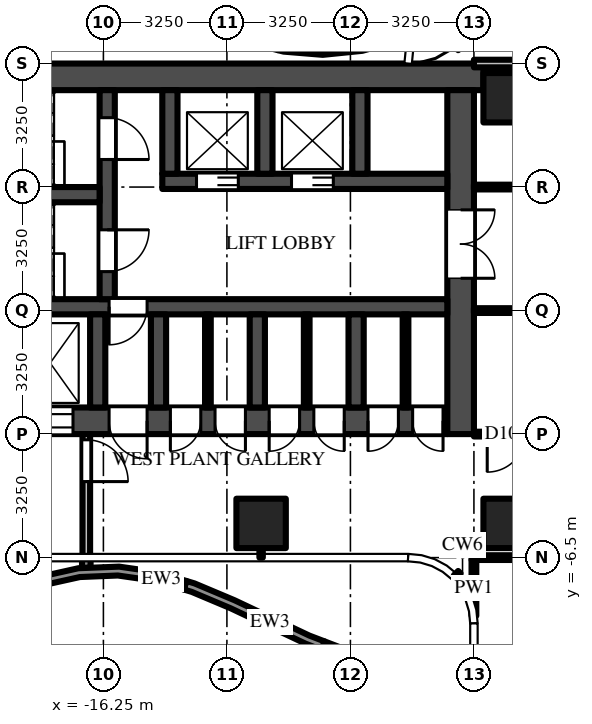
"""IFC4 building model, lengths in metres.
Left out: names, types, materials, properties, quantities, classifications, styles, units other than length and angle.
Written with IfcOpenShell. Run it as: python <this file> out.ifc"""

import sys

from ifc_helpers import new_model, si_unit, direction, frame, frame_2d, origin, origin_2d, place, context, subcontext, project, spatial, polyline, rectangle, outline, extrude, source, transform, mapped, element, fill, save


model = new_model("IFC4")
c1 = context("Model", 3, precision=1e-05, world=origin(), true_north=direction((0.0, 1.0)))
c2 = subcontext(c1, "Body", "Model", "MODEL_VIEW")
j1 = project(units=[si_unit("LENGTHUNIT", "METRE"), si_unit("PLANEANGLEUNIT", "RADIAN")], contexts=[c1])
p1 = place(None, origin())
s1 = spatial("IfcSite", under=j1, at=p1, CompositionType="ELEMENT")
p2 = place(p1, origin())
s2 = spatial("IfcBuilding", under=s1, at=p2, CompositionType="ELEMENT")
p3 = place(p2, frame((0.0, 0.0, 92.5)))
s3 = spatial("IfcBuildingStorey", under=s2, at=p3, CompositionType="ELEMENT", Elevation=92.5)
m1 = source(origin(), c2, "Body", "SweptSolid", [
    extrude(rectangle(XDim=1.3, YDim=1.3, at=origin_2d()), origin(), (0.0, 0.0, 1.0), 5.0),
])
for number, where, z_axis, x_axis in (
    (1, (-5.6, 5.6, 0.0), (0.0, 0.0, 1.0), (1.0, 0.0, 0.0)),
    (2, (-5.6, -5.6, 0.0), (0.0, 0.0, 1.0), (1.0, 0.0, 0.0)),
    (3, (-12.1, -5.6, 0.0), (0.0, 0.0, 1.0), (1.0, 0.0, 0.0)),
):
    element("IfcColumn", number, at=place(p3, frame(where, z_axis=z_axis, x_axis=x_axis)), inside=s3, PredefinedType="COLUMN", context=c2, shape_type="MappedRepresentation", body=[
        mapped(m1, transform((0.0, 0.0, 0.0))),
    ])
m2 = source(origin(), c2, "Body", "SweptSolid", [
    extrude(rectangle(XDim=16.5, YDim=0.7, at=frame_2d((8.25, 0.0))), origin(), (0.0, 0.0, 1.0), 4.75),
])
p4 = place(p3, frame((-6.25, 6.15, 0.0), z_axis=(0.0, 0.0, 1.0), x_axis=(-1.0, 0.0, 0.0)))
e4 = element("IfcWall", 4, at=p4, inside=s3, PredefinedType="SHEAR", context=c2, shape_type="MappedRepresentation", body=[
    mapped(m2, transform((0.0, 0.0, 0.0))),
])
m3 = source(origin(), c2, "Body", "SweptSolid", [
    extrude(rectangle(XDim=14.85, YDim=0.7, at=frame_2d((7.425, 0.0))), origin(), (0.0, 0.0, 1.0), 4.75),
])
p5 = place(p3, frame((-7.2, -2.9, 0.0), z_axis=(0.0, 0.0, 1.0), x_axis=(-1.0, 0.0, 0.0)))
e5 = element("IfcWall", 5, at=p5, inside=s3, PredefinedType="SHEAR", context=c2, shape_type="MappedRepresentation", body=[
    mapped(m3, transform((0.0, 0.0, 0.0))),
])
m4 = source(origin(), c2, "Body", "SweptSolid", [
    extrude(rectangle(XDim=1.3, YDim=2.1, at=frame_2d((0.65, 1.05))), frame((0.0, 0.36, 0.0), z_axis=(0.0, -1.0, 0.0), x_axis=(1.0, 0.0, 0.0)), (0.0, 0.0, 1.0), 0.72),
])
p6 = place(p5, frame((12.2, 0.0, 0.0)))
e6 = element("IfcOpeningElement", 6, at=p6, cuts=e5, PredefinedType="OPENING", context=c2, shape_type="MappedRepresentation", body=[
    mapped(m4, transform((0.0, 0.0, 0.0))),
])
m5 = source(origin(), c2, "Body", "SweptSolid", [
    extrude(rectangle(XDim=1.2, YDim=2.1, at=frame_2d((0.6, 1.05))), frame((0.0, 0.36, 0.0), z_axis=(0.0, -1.0, 0.0), x_axis=(1.0, 0.0, 0.0)), (0.0, 0.0, 1.0), 0.72),
])
p7 = place(p5, frame((9.85, 0.0, 0.0)))
e7 = element("IfcOpeningElement", 7, at=p7, cuts=e5, PredefinedType="OPENING", context=c2, shape_type="MappedRepresentation", body=[
    mapped(m5, transform((0.0, 0.0, 0.0))),
])
m6 = source(origin(), c2, "Body", "SweptSolid", [
    extrude(rectangle(XDim=1.0, YDim=2.1, at=frame_2d((0.5, 1.05))), frame((0.0, 0.36, 0.0), z_axis=(0.0, -1.0, 0.0), x_axis=(1.0, 0.0, 0.0)), (0.0, 0.0, 1.0), 0.72),
])
p8 = place(p5, frame((7.9, 0.0, 0.0)))
e8 = element("IfcOpeningElement", 8, at=p8, cuts=e5, PredefinedType="OPENING", context=c2, shape_type="MappedRepresentation", body=[
    mapped(m6, transform((0.0, 0.0, 0.0))),
])
m7 = source(origin(), c2, "Body", "SweptSolid", [
    extrude(rectangle(XDim=0.8, YDim=2.1, at=frame_2d((0.4, 1.05))), frame((0.0, 0.36, 0.0), z_axis=(0.0, -1.0, 0.0), x_axis=(1.0, 0.0, 0.0)), (0.0, 0.0, 1.0), 0.72),
])
p9 = place(p5, frame((0.113, 0.0, 0.0)))
e9 = element("IfcOpeningElement", 9, at=p9, cuts=e5, PredefinedType="OPENING", context=c2, shape_type="MappedRepresentation", body=[
    mapped(m7, transform((0.0, 0.0, 0.0))),
])
p10 = place(p5, frame((1.288, 0.0, 0.0)))
e10 = element("IfcOpeningElement", 10, at=p10, cuts=e5, PredefinedType="OPENING", context=c2, shape_type="MappedRepresentation", body=[
    mapped(m7, transform((0.0, 0.0, 0.0))),
])
p11 = place(p5, frame((2.712, 0.0, 0.0)))
e11 = element("IfcOpeningElement", 11, at=p11, cuts=e5, PredefinedType="OPENING", context=c2, shape_type="MappedRepresentation", body=[
    mapped(m7, transform((0.0, 0.0, 0.0))),
])
p12 = place(p5, frame((3.887, 0.0, 0.0)))
e12 = element("IfcOpeningElement", 12, at=p12, cuts=e5, PredefinedType="OPENING", context=c2, shape_type="MappedRepresentation", body=[
    mapped(m7, transform((0.0, 0.0, 0.0))),
])
p13 = place(p5, frame((5.312, 0.0, 0.0)))
e13 = element("IfcOpeningElement", 13, at=p13, cuts=e5, PredefinedType="OPENING", context=c2, shape_type="MappedRepresentation", body=[
    mapped(m7, transform((0.0, 0.0, 0.0))),
])
p14 = place(p5, frame((6.488, 0.0, 0.0)))
e14 = element("IfcOpeningElement", 14, at=p14, cuts=e5, PredefinedType="OPENING", context=c2, shape_type="MappedRepresentation", body=[
    mapped(m7, transform((0.0, 0.0, 0.0))),
])
m8 = source(origin(), c2, "Body", "SweptSolid", [
    extrude(rectangle(XDim=9.05, YDim=0.7, at=frame_2d((4.525, 0.0))), origin(), (0.0, 0.0, 1.0), 4.75),
])
p15 = place(p3, frame((-6.85, 5.8, 0.0), z_axis=(0.0, 0.0, 1.0), x_axis=(0.0, -1.0, 0.0)))
e15 = element("IfcWall", 15, at=p15, inside=s3, PredefinedType="SHEAR", context=c2, shape_type="MappedRepresentation", body=[
    mapped(m8, transform((0.0, 0.0, 0.0))),
])
m9 = source(origin(), c2, "Body", "SweptSolid", [
    extrude(rectangle(XDim=1.8, YDim=2.1, at=frame_2d((0.9, 1.05))), frame((0.0, 0.36, 0.0), z_axis=(0.0, -1.0, 0.0), x_axis=(1.0, 0.0, 0.0)), (0.0, 0.0, 1.0), 0.72),
])
p16 = place(p15, frame((3.15, 0.0, 0.0)))
e16 = element("IfcOpeningElement", 16, at=p16, cuts=e15, PredefinedType="OPENING", context=c2, shape_type="MappedRepresentation", body=[
    mapped(m9, transform((0.0, 0.0, 0.0))),
])
m10 = source(origin(), c2, "Body", "SweptSolid", [
    extrude(rectangle(XDim=7.5, YDim=0.4, at=frame_2d((3.75, 0.0))), origin(), (0.0, 0.0, 1.0), 4.75),
])
p17 = place(p3, frame((-7.2, 3.4, 0.0), z_axis=(0.0, 0.0, 1.0), x_axis=(-1.0, 0.0, 0.0)))
e17 = element("IfcWall", 17, at=p17, inside=s3, PredefinedType="SHEAR", context=c2, shape_type="MappedRepresentation", body=[
    mapped(m10, transform((0.0, 0.0, 0.0))),
])
m11 = source(origin(), c2, "Body", "SweptSolid", [
    extrude(rectangle(XDim=1.1, YDim=2.1, at=frame_2d((0.55, 1.05))), frame((0.0, 0.21, 0.0), z_axis=(0.0, -1.0, 0.0), x_axis=(1.0, 0.0, 0.0)), (0.0, 0.0, 1.0), 0.42),
])
p18 = place(p17, frame((3.0, 0.0, 0.0)))
e18 = element("IfcOpeningElement", 18, at=p18, cuts=e17, PredefinedType="OPENING", context=c2, shape_type="MappedRepresentation", body=[
    mapped(m11, transform((0.0, 0.0, 0.0))),
])
p19 = place(p17, frame((5.5, 0.0, 0.0)))
e19 = element("IfcOpeningElement", 19, at=p19, cuts=e17, PredefinedType="OPENING", context=c2, shape_type="MappedRepresentation", body=[
    mapped(m11, transform((0.0, 0.0, 0.0))),
])
m12 = source(origin(), c2, "Body", "SweptSolid", [
    extrude(rectangle(XDim=14.85, YDim=0.4, at=frame_2d((7.425, 0.0))), origin(), (0.0, 0.0, 1.0), 4.75),
])
p20 = place(p3, frame((-7.2, 0.1, 0.0), z_axis=(0.0, 0.0, 1.0), x_axis=(-1.0, 0.0, 0.0)))
e20 = element("IfcWall", 20, at=p20, inside=s3, PredefinedType="SHEAR", context=c2, shape_type="MappedRepresentation", body=[
    mapped(m12, transform((0.0, 0.0, 0.0))),
])
m13 = source(origin(), c2, "Body", "SweptSolid", [
    extrude(rectangle(XDim=1.0, YDim=2.1, at=frame_2d((0.5, 1.05))), frame((0.0, 0.21, 0.0), z_axis=(0.0, -1.0, 0.0), x_axis=(1.0, 0.0, 0.0)), (0.0, 0.0, 1.0), 0.42),
])
p21 = place(p20, frame((7.9, 0.0, 0.0)))
e21 = element("IfcOpeningElement", 21, at=p21, cuts=e20, PredefinedType="OPENING", context=c2, shape_type="MappedRepresentation", body=[
    mapped(m13, transform((0.0, 0.0, 0.0))),
])
m14 = source(origin(), c2, "Body", "SweptSolid", [
    extrude(rectangle(XDim=5.5, YDim=0.4, at=frame_2d((2.75, 0.0))), origin(), (0.0, 0.0, 1.0), 4.75),
])
p22 = place(p3, frame((-16.15, 5.8, 0.0), z_axis=(0.0, 0.0, 1.0), x_axis=(0.0, -1.0, 0.0)))
e22 = element("IfcWall", 22, at=p22, inside=s3, PredefinedType="SHEAR", context=c2, shape_type="MappedRepresentation", body=[
    mapped(m14, transform((0.0, 0.0, 0.0))),
])
p23 = place(p22, frame((0.725, 0.0, 0.0)))
e23 = element("IfcOpeningElement", 23, at=p23, cuts=e22, PredefinedType="OPENING", context=c2, shape_type="MappedRepresentation", body=[
    mapped(m11, transform((0.0, 0.0, 0.0))),
])
p24 = place(p22, frame((3.675, 0.0, 0.0)))
e24 = element("IfcOpeningElement", 24, at=p24, cuts=e22, PredefinedType="OPENING", context=c2, shape_type="MappedRepresentation", body=[
    mapped(m11, transform((0.0, 0.0, 0.0))),
])
m15 = source(origin(), c2, "Body", "SweptSolid", [
    extrude(rectangle(XDim=5.7, YDim=0.4, at=frame_2d((2.85, 0.0))), origin(), (0.0, 0.0, 1.0), 4.75),
])
p25 = place(p3, frame((-16.35, 3.05, 0.0), z_axis=(0.0, 0.0, 1.0), x_axis=(-1.0, 0.0, 0.0)))
e25 = element("IfcWall", 25, at=p25, inside=s3, PredefinedType="SHEAR", context=c2, shape_type="MappedRepresentation", body=[
    mapped(m15, transform((0.0, 0.0, 0.0))),
])
m16 = source(origin(), c2, "Body", "SweptSolid", [
    extrude(rectangle(XDim=2.2, YDim=0.4, at=frame_2d((1.1, 0.0))), origin(), (0.0, 0.0, 1.0), 4.75),
])
for number, where, z_axis, x_axis in (
    (26, (-9.5, 5.8, 0.0), (0.0, 0.0, 1.0), (0.0, -1.0, 0.0)),
    (27, (-12.0, 5.8, 0.0), (0.0, 0.0, 1.0), (0.0, -1.0, 0.0)),
    (28, (-14.5, 5.8, 0.0), (0.0, 0.0, 1.0), (0.0, -1.0, 0.0)),
):
    element("IfcWall", number, at=place(p3, frame(where, z_axis=z_axis, x_axis=x_axis)), inside=s3, PredefinedType="SHEAR", context=c2, shape_type="MappedRepresentation", body=[
        mapped(m16, transform((0.0, 0.0, 0.0))),
    ])
m17 = source(origin(), c2, "Body", "SweptSolid", [
    extrude(rectangle(XDim=2.45, YDim=0.4, at=frame_2d((1.225, 0.0))), origin(), (0.0, 0.0, 1.0), 4.75),
])
for number, where, z_axis, x_axis in (
    (29, (-9.6, -0.1, 0.0), (0.0, 0.0, 1.0), (0.0, -1.0, 0.0)),
    (30, (-12.2, -0.1, 0.0), (0.0, 0.0, 1.0), (0.0, -1.0, 0.0)),
    (31, (-14.8, -0.1, 0.0), (0.0, 0.0, 1.0), (0.0, -1.0, 0.0)),
    (32, (-16.4, -0.1, 0.0), (0.0, 0.0, 1.0), (0.0, -1.0, 0.0)),
):
    element("IfcWall", number, at=place(p3, frame(where, z_axis=z_axis, x_axis=x_axis)), inside=s3, PredefinedType="SHEAR", context=c2, shape_type="MappedRepresentation", body=[
        mapped(m17, transform((0.0, 0.0, 0.0))),
    ])
m18 = source(origin(), c2, "Body", "SweptSolid", [
    extrude(rectangle(XDim=3.25, YDim=0.2, at=frame_2d((1.625, 0.0))), origin(), (0.0, 0.0, 1.0), 4.75),
])
p26 = place(p3, frame((-16.7, -3.25, 0.0), z_axis=(0.0, 0.0, 1.0), x_axis=(0.0, -1.0, 0.0)))
e33 = element("IfcWall", 33, at=p26, inside=s3, PredefinedType="PARTITIONING", context=c2, shape_type="MappedRepresentation", body=[
    mapped(m18, transform((0.0, 0.0, 0.0))),
])
m19 = source(origin(), c2, "Body", "SweptSolid", [
    extrude(rectangle(XDim=1.1, YDim=2.1, at=frame_2d((0.55, 1.05))), frame((0.0, 0.11, 0.0), z_axis=(0.0, -1.0, 0.0), x_axis=(1.0, 0.0, 0.0)), (0.0, 0.0, 1.0), 0.22),
])
p27 = place(p26, frame((0.15, 0.0, 0.0)))
e34 = element("IfcOpeningElement", 34, at=p27, cuts=e33, PredefinedType="OPENING", context=c2, shape_type="MappedRepresentation", body=[
    mapped(m19, transform((0.0, 0.0, 0.0))),
])
m20 = source(origin(), c2, "Body", "SweptSolid", [
    extrude(rectangle(XDim=2.45, YDim=0.15, at=frame_2d((1.225, 0.0))), origin(), (0.0, 0.0, 1.0), 4.75),
])
for number, where, z_axis, x_axis in (
    (35, (-8.3, -0.1, 0.0), (0.0, 0.0, 1.0), (0.0, -1.0, 0.0)),
    (36, (-10.9, -0.1, 0.0), (0.0, 0.0, 1.0), (0.0, -1.0, 0.0)),
    (37, (-13.5, -0.1, 0.0), (0.0, 0.0, 1.0), (0.0, -1.0, 0.0)),
):
    element("IfcWall", number, at=place(p3, frame(where, z_axis=z_axis, x_axis=x_axis)), inside=s3, PredefinedType="PARTITIONING", context=c2, shape_type="MappedRepresentation", body=[
        mapped(m20, transform((0.0, 0.0, 0.0))),
    ])
p28 = place(p3, frame((-16.7, -6.5, 0.0), z_axis=(0.0, 0.0, 1.0), x_axis=(0.0, -1.0, 0.0)))
e38 = element("IfcWall", 38, at=p28, inside=s3, PredefinedType="PARAPET", context=c2, shape_type="SweptSolid", body=[
    extrude(rectangle(XDim=0.268, YDim=0.225, at=frame_2d((0.134, 0.0))), origin(), (0.0, 0.0, 1.0), 1.1),
])
p29 = place(p3, origin())
e39 = element("IfcWall", 39, at=p29, inside=s3, PredefinedType="PARAPET", context=c2, shape_type="SweptSolid", body=[
    extrude(outline(polyline([(-11.6, 7.079), (-11.461, 7.044), (-10.47, 6.964), (-9.47, 7.068), (-8.543, 7.324), (-8.396, 7.406), (-8.194, 7.598), (-8.121, 7.709), (-7.927, 7.579), (-8.021, 7.439), (-8.229, 7.237), (-8.422, 7.119), (-8.466, 7.101), (-9.436, 6.835), (-10.478, 6.729), (-11.509, 6.814), (-11.658, 6.852), (-11.6, 7.079)])), origin(), (0.0, 0.0, 1.0), 1.1),
])
e40 = element("IfcWall", 40, at=p29, inside=s3, PredefinedType="PARAPET", context=c2, shape_type="SweptSolid", body=[
    extrude(outline(polyline([(-7.667, -10.863), (-7.699, -10.782), (-8.24, -9.633), (-8.344, -9.506), (-8.373, -9.486), (-8.528, -9.431), (-8.94, -9.388), (-9.936, -9.145), (-10.512, -8.925), (-10.429, -8.705), (-9.859, -8.923), (-8.892, -9.157), (-8.49, -9.198), (-8.444, -9.209), (-8.263, -9.276), (-8.185, -9.331), (-8.06, -9.478), (-8.034, -9.519), (-7.485, -10.685), (-7.449, -10.777), (-7.667, -10.863)])), origin(), (0.0, 0.0, 1.0), 1.1),
])
e41 = element("IfcWall", 41, at=p29, inside=s3, PredefinedType="PARAPET", context=c2, shape_type="SweptSolid", body=[
    extrude(outline(polyline([(-10.512, -8.925), (-10.925, -8.767), (-12.899, -7.834), (-13.926, -7.402), (-14.135, -7.339), (-14.067, -7.114), (-13.852, -7.179), (-12.802, -7.621), (-10.829, -8.552), (-10.429, -8.705), (-10.512, -8.925)])), origin(), (0.0, 0.0, 1.0), 1.1),
])
e42 = element("IfcWall", 42, at=p29, inside=s3, PredefinedType="PARAPET", context=c2, shape_type="SweptSolid", body=[
    extrude(outline(polyline([(-14.135, -7.339), (-14.879, -7.113), (-15.87, -6.971), (-16.866, -7.011), (-17.913, -7.243), (-17.918, -7.245), (-17.969, -7.016), (-16.907, -6.779), (-15.834, -6.738), (-14.837, -6.882), (-14.067, -7.114), (-14.135, -7.339)])), origin(), (0.0, 0.0, 1.0), 1.1),
])
m21 = source(origin(), c2, "Body", "SweptSolid", [
    extrude(rectangle(XDim=1.469, YDim=0.125, at=frame_2d((0.734, 0.0))), origin(), (0.0, 0.0, 1.0), 4.75),
])
p30 = place(p3, frame((-6.5, -6.562, 0.0), z_axis=(0.0, 0.0, 1.0), x_axis=(0.0, -1.0, 0.0)))
e43 = element("IfcWall", 43, at=p30, inside=s3, PredefinedType="PARTITIONING", context=c2, shape_type="MappedRepresentation", body=[
    mapped(m21, transform((0.0, 0.0, 0.0))),
])
m22 = source(origin(), c2, "Body", "SweptSolid", [
    extrude(rectangle(XDim=5.425, YDim=0.125, at=frame_2d((2.712, 0.0))), origin(), (0.0, 0.0, 1.0), 4.23),
])
p31 = place(p3, frame((-1.137, -6.5, 0.0), z_axis=(0.0, 0.0, 1.0), x_axis=(-1.0, 0.0, 0.0)))
e44 = element("IfcWall", 44, at=p31, inside=s3, PredefinedType="PARTITIONING", context=c2, shape_type="MappedRepresentation", body=[
    mapped(m22, transform((0.0, 0.0, 0.0))),
])
m23 = source(origin(), c2, "Body", "SweptSolid", [
    extrude(rectangle(XDim=5.363, YDim=0.125, at=frame_2d((2.681, 0.0))), origin(), (0.0, 0.0, 1.0), 3.968),
])
p32 = place(p3, frame((-1.137, -3.25, 0.0), z_axis=(0.0, 0.0, 1.0), x_axis=(-1.0, 0.0, 0.0)))
e45 = element("IfcWall", 45, at=p32, inside=s3, PredefinedType="PARTITIONING", context=c2, shape_type="MappedRepresentation", body=[
    mapped(m23, transform((0.0, 0.0, 0.0))),
])
m24 = source(origin(), c2, "Body", "SweptSolid", [
    extrude(rectangle(XDim=1.0, YDim=2.1, at=frame_2d((0.5, 1.05))), frame((0.0, 0.073, 0.0), z_axis=(0.0, -1.0, 0.0), x_axis=(1.0, 0.0, 0.0)), (0.0, 0.0, 1.0), 0.145),
])
p33 = place(p32, frame((4.012, 0.0, 0.0)))
e46 = element("IfcOpeningElement", 46, at=p33, cuts=e45, PredefinedType="OPENING", context=c2, shape_type="MappedRepresentation", body=[
    mapped(m24, transform((0.0, 0.0, 0.0))),
])
p34 = place(p3, frame((-1.137, 0.0, 0.0), z_axis=(0.0, 0.0, 1.0), x_axis=(-1.0, 0.0, 0.0)))
e47 = element("IfcWall", 47, at=p34, inside=s3, PredefinedType="PARTITIONING", context=c2, shape_type="MappedRepresentation", body=[
    mapped(m23, transform((0.0, 0.0, 0.0))),
])
p35 = place(p3, frame((-6.5, 3.25, 0.0), z_axis=(0.0, 0.0, 1.0), x_axis=(1.0, 0.0, 0.0)))
e48 = element("IfcWall", 48, at=p35, inside=s3, PredefinedType="PARTITIONING", context=c2, shape_type="MappedRepresentation", body=[
    mapped(m23, transform((0.0, 0.0, 0.0))),
])
p36 = place(p35, frame((3.95, 0.0, 0.0)))
e49 = element("IfcOpeningElement", 49, at=p36, cuts=e48, PredefinedType="OPENING", context=c2, shape_type="MappedRepresentation", body=[
    mapped(m24, transform((0.0, 0.0, 0.0))),
])
p37 = place(p3, frame((-6.5, 6.5, 0.0), z_axis=(0.0, 0.0, 1.0), x_axis=(1.0, 0.0, 0.0)))
e50 = element("IfcWall", 50, at=p37, inside=s3, PredefinedType="PARTITIONING", context=c2, shape_type="SweptSolid", body=[
    extrude(rectangle(XDim=5.363, YDim=0.2, at=frame_2d((2.681, 0.0))), origin(), (0.0, 0.0, 1.0), 4.23),
])
m25 = source(origin(), c2, "Body", "SweptSolid", [
    extrude(rectangle(XDim=1.1, YDim=2.1, at=frame_2d((0.55, 1.05))), frame((0.0, 0.025, 0.0), z_axis=(0.0, -1.0, 0.0), x_axis=(1.0, 0.0, 0.0)), (0.0, 0.0, 1.0), 0.05),
])
p38 = place(p18, origin())
e51 = element("IfcDoor", 51, at=p38, inside=s3, OperationType="DOUBLE_DOOR_SLIDING", PredefinedType="DOOR", context=c2, shape_type="MappedRepresentation", body=[
    mapped(m25, transform((0.0, 0.0, 0.0))),
])
fill(e18, e51)
p39 = place(p19, origin())
e52 = element("IfcDoor", 52, at=p39, inside=s3, OperationType="DOUBLE_DOOR_SLIDING", PredefinedType="DOOR", context=c2, shape_type="MappedRepresentation", body=[
    mapped(m25, transform((0.0, 0.0, 0.0))),
])
fill(e19, e52)
m26 = source(origin(), c2, "Body", "SweptSolid", [
    extrude(rectangle(XDim=1.2, YDim=2.1, at=frame_2d((0.6, 1.05))), frame((0.0, -0.275, 0.0), z_axis=(0.0, -1.0, 0.0), x_axis=(1.0, 0.0, 0.0)), (0.0, 0.0, 1.0), 0.05),
])
p40 = place(p7, origin())
e53 = element("IfcDoor", 53, at=p40, inside=s3, OperationType="DOUBLE_DOOR_SLIDING", PredefinedType="DOOR", context=c2, shape_type="MappedRepresentation", body=[
    mapped(m26, transform((0.0, 0.0, 0.0))),
])
fill(e7, e53)
m27 = source(origin(), c2, "Body", "SweptSolid", [
    extrude(rectangle(XDim=1.8, YDim=2.1, at=frame_2d((0.9, 1.05))), frame((0.0, -0.275, 0.0), z_axis=(0.0, -1.0, 0.0), x_axis=(1.0, 0.0, 0.0)), (0.0, 0.0, 1.0), 0.05),
])
p41 = place(p16, origin())
e54 = element("IfcDoor", 54, at=p41, inside=s3, OperationType="DOUBLE_DOOR_SINGLE_SWING", PredefinedType="DOOR", context=c2, shape_type="MappedRepresentation", body=[
    mapped(m27, transform((0.0, 0.0, 0.0))),
])
fill(e16, e54)
p42 = place(p23, origin())
e55 = element("IfcDoor", 55, at=p42, inside=s3, OperationType="SINGLE_SWING_RIGHT", PredefinedType="DOOR", context=c2, shape_type="MappedRepresentation", body=[
    mapped(m25, transform((0.0, 0.0, 0.0))),
])
fill(e23, e55)
p43 = place(p24, origin())
e56 = element("IfcDoor", 56, at=p43, inside=s3, OperationType="SINGLE_SWING_LEFT", PredefinedType="DOOR", context=c2, shape_type="MappedRepresentation", body=[
    mapped(m25, transform((0.0, 0.0, 0.0))),
])
fill(e24, e56)
m28 = source(origin(), c2, "Body", "SweptSolid", [
    extrude(rectangle(XDim=1.0, YDim=2.1, at=frame_2d((0.5, 1.05))), frame((0.0, 0.025, 0.0), z_axis=(0.0, -1.0, 0.0), x_axis=(1.0, 0.0, 0.0)), (0.0, 0.0, 1.0), 0.05),
])
p44 = place(p21, origin())
e57 = element("IfcDoor", 57, at=p44, inside=s3, OperationType="SINGLE_SWING_RIGHT", PredefinedType="DOOR", context=c2, shape_type="MappedRepresentation", body=[
    mapped(m28, transform((0.0, 0.0, 0.0))),
])
fill(e21, e57)
m29 = source(origin(), c2, "Body", "SweptSolid", [
    extrude(rectangle(XDim=1.0, YDim=2.1, at=frame_2d((0.5, 1.05))), frame((0.0, -0.275, 0.0), z_axis=(0.0, -1.0, 0.0), x_axis=(1.0, 0.0, 0.0)), (0.0, 0.0, 1.0), 0.05),
])
p45 = place(p8, origin())
e58 = element("IfcDoor", 58, at=p45, inside=s3, OperationType="SINGLE_SWING_LEFT", PredefinedType="DOOR", context=c2, shape_type="MappedRepresentation", body=[
    mapped(m29, transform((0.0, 0.0, 0.0))),
])
fill(e8, e58)
p46 = place(p27, origin())
e59 = element("IfcDoor", 59, at=p46, inside=s3, OperationType="SINGLE_SWING_RIGHT", PredefinedType="DOOR", context=c2, shape_type="MappedRepresentation", body=[
    mapped(m25, transform((0.0, 0.0, 0.0))),
])
fill(e34, e59)
m30 = source(origin(), c2, "Body", "SweptSolid", [
    extrude(rectangle(XDim=0.8, YDim=2.1, at=frame_2d((0.4, 1.05))), frame((0.0, -0.275, 0.0), z_axis=(0.0, -1.0, 0.0), x_axis=(1.0, 0.0, 0.0)), (0.0, 0.0, 1.0), 0.05),
])
p47 = place(p9, origin())
e60 = element("IfcDoor", 60, at=p47, inside=s3, OperationType="SINGLE_SWING_LEFT", PredefinedType="DOOR", context=c2, shape_type="MappedRepresentation", body=[
    mapped(m30, transform((0.0, 0.0, 0.0))),
])
fill(e9, e60)
p48 = place(p10, origin())
e61 = element("IfcDoor", 61, at=p48, inside=s3, OperationType="SINGLE_SWING_RIGHT", PredefinedType="DOOR", context=c2, shape_type="MappedRepresentation", body=[
    mapped(m30, transform((0.0, 0.0, 0.0))),
])
fill(e10, e61)
p49 = place(p11, origin())
e62 = element("IfcDoor", 62, at=p49, inside=s3, OperationType="SINGLE_SWING_LEFT", PredefinedType="DOOR", context=c2, shape_type="MappedRepresentation", body=[
    mapped(m30, transform((0.0, 0.0, 0.0))),
])
fill(e11, e62)
p50 = place(p12, origin())
e63 = element("IfcDoor", 63, at=p50, inside=s3, OperationType="SINGLE_SWING_RIGHT", PredefinedType="DOOR", context=c2, shape_type="MappedRepresentation", body=[
    mapped(m30, transform((0.0, 0.0, 0.0))),
])
fill(e12, e63)
p51 = place(p13, origin())
e64 = element("IfcDoor", 64, at=p51, inside=s3, OperationType="SINGLE_SWING_LEFT", PredefinedType="DOOR", context=c2, shape_type="MappedRepresentation", body=[
    mapped(m30, transform((0.0, 0.0, 0.0))),
])
fill(e13, e64)
p52 = place(p14, origin())
e65 = element("IfcDoor", 65, at=p52, inside=s3, OperationType="SINGLE_SWING_RIGHT", PredefinedType="DOOR", context=c2, shape_type="MappedRepresentation", body=[
    mapped(m30, transform((0.0, 0.0, 0.0))),
])
fill(e14, e65)
p53 = place(p33, origin())
e66 = element("IfcDoor", 66, at=p53, inside=s3, OperationType="SINGLE_SWING_RIGHT", PredefinedType="DOOR", context=c2, shape_type="MappedRepresentation", body=[
    mapped(m28, transform((0.0, 0.0, 0.0))),
])
fill(e46, e66)
save(model, sys.argv[1])
